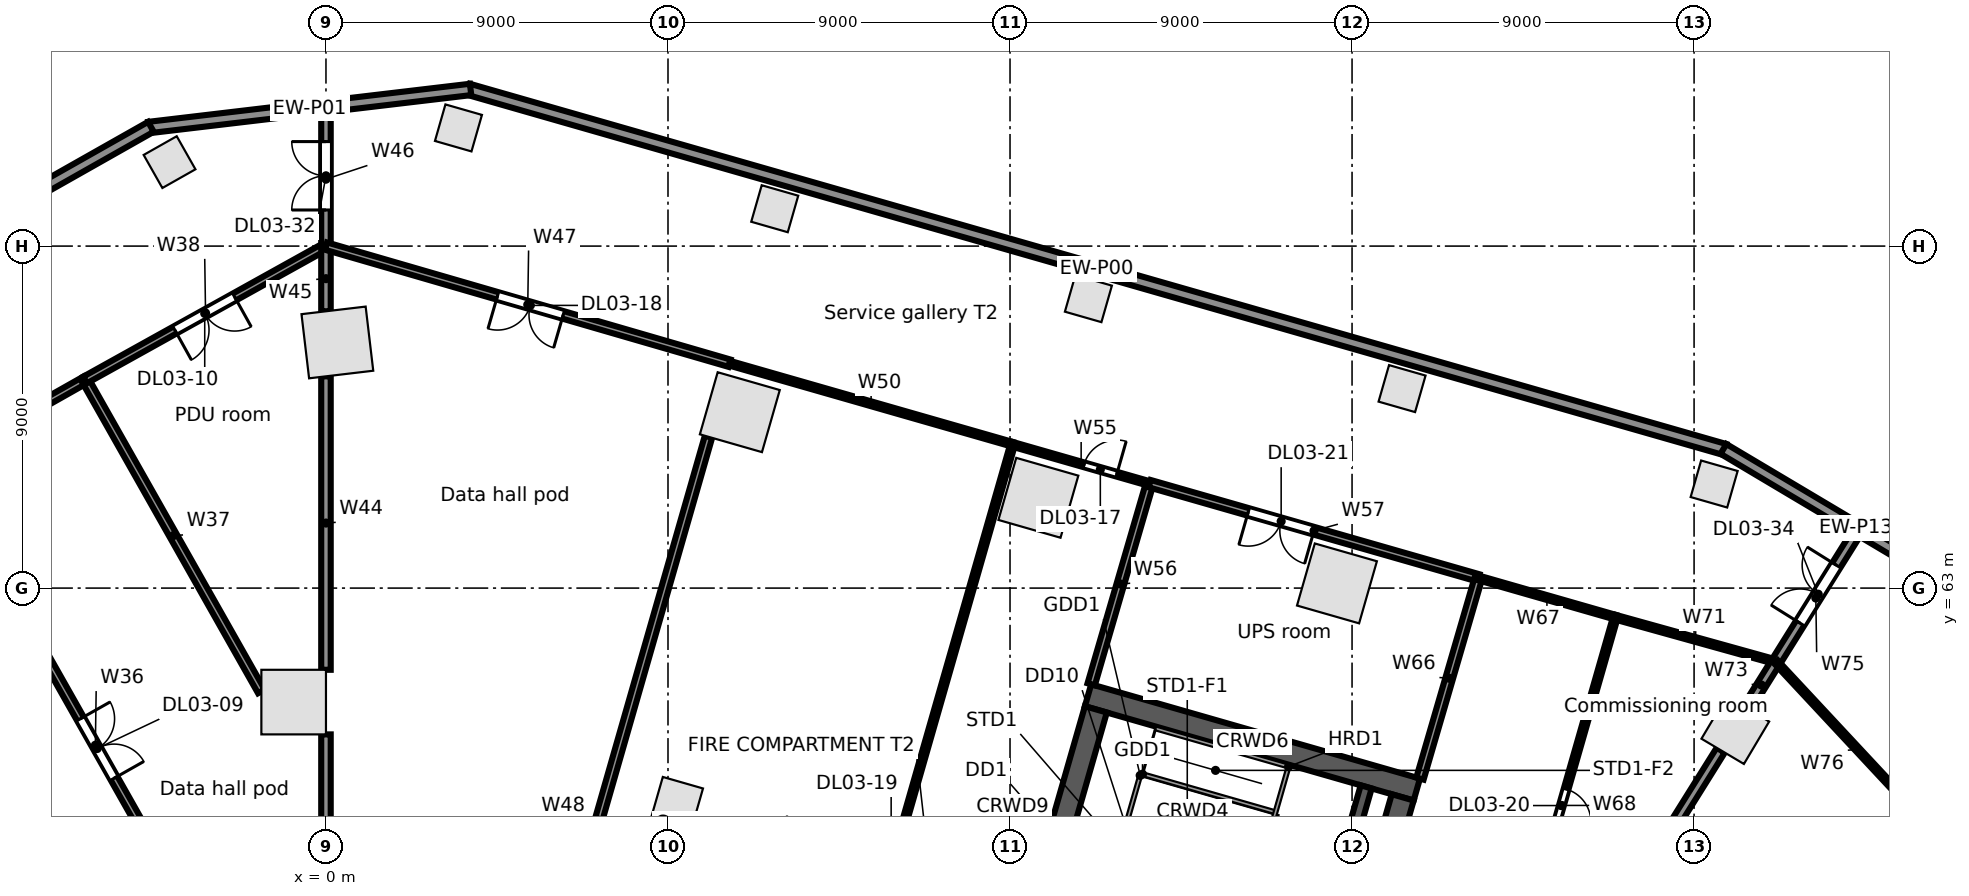
"""IFC4 building model, lengths in metres.
Left out: names, types, materials, properties, quantities, classifications, styles, units other than length and angle.
Written with IfcOpenShell. Run it as: python <this file> out.ifc"""

import sys

from ifc_helpers import new_model, si_unit, direction, frame, frame_2d, origin, origin_2d, place, context, subcontext, project, spatial, rectangle, extrude, element, fill, save


model = new_model("IFC4")
c1 = context("Model", 3, precision=1e-05, world=origin(), true_north=direction((0.0, 1.0)))
c2 = subcontext(c1, "Body", "Model", "MODEL_VIEW")
j1 = project(units=[si_unit("LENGTHUNIT", "METRE"), si_unit("PLANEANGLEUNIT", "RADIAN")], contexts=[c1])
p1 = place(None, origin())
s1 = spatial("IfcSite", under=j1, at=p1, CompositionType="ELEMENT")
p2 = place(p1, origin())
s2 = spatial("IfcBuilding", under=s1, at=p2, CompositionType="ELEMENT")
p3 = place(p2, frame((0.0, 0.0, 16.5)))
s3 = spatial("IfcBuildingStorey", under=s2, at=p3, CompositionType="ELEMENT", Elevation=16.5)
p4 = place(p3, frame((37.085, 59.262, 0.0), z_axis=(0.0, 0.0, 1.0), x_axis=(-0.859406411501, 0.511293086077, 0.0)))
e1 = element("IfcColumn", 1, at=p4, inside=s3, PredefinedType="COLUMN", context=c2, shape_type="SweptSolid", body=[
    extrude(rectangle(XDim=1.3, YDim=1.3, at=origin_2d()), origin(), (0.0, 0.0, 1.0), 5.0),
])
for number, where, z_axis, x_axis in (
    (2, (26.603, 63.124, 0.0), (0.0, 0.0, 1.0), (-0.961, 0.276, 0.0)),
    (3, (18.746, 65.376, 0.0), (0.0, 0.0, 1.0), (-0.961, 0.276, 0.0)),
    (4, (10.89, 67.629, 0.0), (0.0, 0.0, 1.0), (-0.961, 0.276, 0.0)),
    (5, (0.3, 69.464, 0.0), (0.0, 0.0, 1.0), (-0.993, -0.118, 0.0)),
    (6, (-0.85, 60.0, 0.0), (0.0, 0.0, 1.0), (0.0, 1.0, 0.0)),
):
    element("IfcColumn", number, at=place(p3, frame(where, z_axis=z_axis, x_axis=x_axis)), inside=s3, PredefinedType="COLUMN", context=c2, shape_type="SweptSolid", body=[
        extrude(rectangle(XDim=1.7, YDim=1.7, at=origin_2d()), origin(), (0.0, 0.0, 1.0), 5.0),
    ])
for number, where, z_axis, x_axis in (
    (7, (36.528, 65.739, 0.0), (0.0, 0.0, 1.0), (-0.961, 0.276, 0.0)),
    (8, (28.316, 68.25, 0.0), (0.0, 0.0, 1.0), (-0.961, 0.276, 0.0)),
    (9, (20.062, 70.616, 0.0), (0.0, 0.0, 1.0), (-0.961, 0.276, 0.0)),
    (10, (11.809, 72.983, 0.0), (0.0, 0.0, 1.0), (-0.961, 0.276, 0.0)),
    (11, (3.486, 75.11, 0.0), (0.0, 0.0, 1.0), (-0.961, 0.276, 0.0)),
    (12, (-4.116, 74.21, 0.0), (0.0, 0.0, 1.0), (-0.87, -0.492, 0.0)),
):
    element("IfcColumn", number, at=place(p3, frame(where, z_axis=z_axis, x_axis=x_axis)), inside=s3, PredefinedType="COLUMN", context=c2, shape_type="SweptSolid", body=[
        extrude(rectangle(XDim=1.0, YDim=1.0, at=origin_2d()), origin(), (0.0, 0.0, 1.0), 5.0),
    ])
p5 = place(p3, frame((9.241, 57.35, 0.0), z_axis=(0.0, 0.0, 1.0), x_axis=(0.961261695938, -0.275637355817, 0.0)))
e13 = element("IfcColumn", 13, at=p5, inside=s3, PredefinedType="COLUMN", context=c2, shape_type="SweptSolid", body=[
    extrude(rectangle(XDim=1.1, YDim=1.1, at=origin_2d()), origin(), (0.0, 0.0, 1.0), 5.0),
])
p6 = place(p3, frame((3.747, 76.127, 0.0), z_axis=(0.0, 0.0, 1.0), x_axis=(0.961261546185, -0.275637878067, 0.0)))
e14 = element("IfcWall", 14, at=p6, inside=s3, PredefinedType="STANDARD", context=c2, shape_type="SweptSolid", body=[
    extrude(rectangle(XDim=34.395, YDim=0.3, at=frame_2d((17.197, 0.0))), origin(), (0.0, 0.0, 1.0), 4.65),
])
p7 = place(p3, frame((-4.663, 75.12, 0.0), z_axis=(0.0, 0.0, 1.0), x_axis=(0.993070050845, 0.117523929966, 0.0)))
e15 = element("IfcWall", 15, at=p7, inside=s3, PredefinedType="STANDARD", context=c2, shape_type="SweptSolid", body=[
    extrude(rectangle(XDim=8.528, YDim=0.3, at=frame_2d((4.264, 0.0))), origin(), (0.0, 0.0, 1.0), 4.65),
])
p8 = place(p3, frame((-63.707, 41.701, 0.0), z_axis=(0.0, 0.0, 1.0), x_axis=(0.870355510268, 0.492423888277, 0.0)))
e16 = element("IfcWall", 16, at=p8, inside=s3, PredefinedType="STANDARD", context=c2, shape_type="SweptSolid", body=[
    extrude(rectangle(XDim=67.903, YDim=0.3, at=frame_2d((33.952, 0.0))), origin(), (0.0, 0.0, 1.0), 4.65),
])
p9 = place(p3, frame((36.773, 66.662, 0.0), z_axis=(0.0, 0.0, 1.0), x_axis=(0.859395976805, -0.511310624817, 0.0)))
e17 = element("IfcWall", 17, at=p9, inside=s3, PredefinedType="STANDARD", context=c2, shape_type="SweptSolid", body=[
    extrude(rectangle(XDim=8.102, YDim=0.3, at=frame_2d((4.051, 0.0))), origin(), (0.0, 0.0, 1.0), 4.65),
])
p10 = place(p3, frame((-11.681, 60.744, 0.0), z_axis=(0.0, 0.0, 1.0), x_axis=(0.492426772896, -0.870353878221, 0.0)))
e18 = element("IfcWall", 18, at=p10, inside=s3, PredefinedType="SOLIDWALL", context=c2, shape_type="SweptSolid", body=[
    extrude(rectangle(XDim=12.8, YDim=0.6, at=frame_2d((6.4, 0.0))), origin(), (0.0, 0.0, 1.0), 4.65),
])
p11 = place(p3, frame((20.053, 60.18, 0.0), z_axis=(0.0, 0.0, 1.0), x_axis=(0.96126248289, -0.275634611374, 0.0)))
e19 = element("IfcWall", 19, at=p11, inside=s3, PredefinedType="SOLIDWALL", context=c2, shape_type="SweptSolid", body=[
    extrude(rectangle(XDim=9.0, YDim=0.6, at=frame_2d((4.5, 0.0))), origin(), (0.0, 0.0, 1.0), 4.65),
])
p12 = place(p3, frame((17.282, 49.427, 0.0), z_axis=(0.0, 0.0, 1.0), x_axis=(0.275631631629, 0.961263337304, 0.0)))
e20 = element("IfcWall", 20, at=p12, inside=s3, PredefinedType="SOLIDWALL", context=c2, shape_type="SweptSolid", body=[
    extrude(rectangle(XDim=10.8, YDim=0.6, at=frame_2d((5.4, 0.0))), origin(), (0.0, 0.0, 1.0), 4.65),
])
p13 = place(p12, frame((4.8, 0.0, 0.0)))
e21 = element("IfcOpeningElement", 21, at=p13, cuts=e20, PredefinedType="OPENING", context=c2, shape_type="SweptSolid", body=[
    extrude(rectangle(XDim=1.2, YDim=2.1, at=frame_2d((0.6, 1.05))), frame((0.0, 0.31, 0.0), z_axis=(0.0, -1.0, 0.0), x_axis=(1.0, 0.0, 0.0)), (0.0, 0.0, 1.0), 0.62),
])
p14 = place(p3, frame((26.256, 53.876, 0.0), z_axis=(0.0, 0.0, 1.0), x_axis=(0.275612739511, 0.961268754209, 0.0)))
e22 = element("IfcWall", 22, at=p14, inside=s3, PredefinedType="SOLIDWALL", context=c2, shape_type="SweptSolid", body=[
    extrude(rectangle(XDim=4.05, YDim=0.3, at=frame_2d((2.025, 0.0))), origin(), (0.0, 0.0, 1.0), 4.65),
])
p15 = place(p3, frame((25.356, 47.112, 0.0), z_axis=(0.0, 0.0, 1.0), x_axis=(0.275631631629, 0.961263337304, 0.0)))
e23 = element("IfcWall", 23, at=p15, inside=s3, PredefinedType="SOLIDWALL", context=c2, shape_type="SweptSolid", body=[
    extrude(rectangle(XDim=10.8, YDim=0.6, at=frame_2d((5.4, 0.0))), origin(), (0.0, 0.0, 1.0), 4.65),
])
p16 = place(p15, frame((4.8, 0.0, 0.0)))
e24 = element("IfcOpeningElement", 24, at=p16, cuts=e23, PredefinedType="OPENING", context=c2, shape_type="SweptSolid", body=[
    extrude(rectangle(XDim=1.2, YDim=2.1, at=frame_2d((0.6, 1.05))), frame((0.0, 0.31, 0.0), z_axis=(0.0, -1.0, 0.0), x_axis=(1.0, 0.0, 0.0)), (0.0, 0.0, 1.0), 0.62),
])
p17 = place(p3, frame((-10.254, 66.263, 0.0), z_axis=(0.0, 0.0, 1.0), x_axis=(0.870454697906, 0.492248533664, 0.0)))
e25 = element("IfcWall", 25, at=p17, inside=s3, PredefinedType="PARTITIONING", context=c2, shape_type="SweptSolid", body=[
    extrude(rectangle(XDim=4.5, YDim=0.2, at=frame_2d((2.25, 0.0))), origin(), (0.0, 0.0, 1.0), 4.65),
])
p18 = place(p3, frame((-10.254, 66.263, 0.0), z_axis=(0.0, 0.0, 1.0), x_axis=(0.492411664329, -0.870362426138, 0.0)))
e26 = element("IfcWall", 26, at=p18, inside=s3, PredefinedType="PARTITIONING", context=c2, shape_type="SweptSolid", body=[
    extrude(rectangle(XDim=17.0, YDim=0.2, at=frame_2d((8.5, 0.0))), origin(), (0.0, 0.0, 1.0), 3.712),
])
p19 = place(p18, frame((7.7, 0.0, 0.0)))
e27 = element("IfcOpeningElement", 27, at=p19, cuts=e26, PredefinedType="OPENING", context=c2, shape_type="SweptSolid", body=[
    extrude(rectangle(XDim=1.8, YDim=2.1, at=frame_2d((0.9, 1.05))), frame((0.0, 0.11, 0.0), z_axis=(0.0, -1.0, 0.0), x_axis=(1.0, 0.0, 0.0)), (0.0, 0.0, 1.0), 0.22),
])
p20 = place(p3, frame((-6.337, 68.478, 0.0), z_axis=(0.0, 0.0, 1.0), x_axis=(0.492412602502, -0.870361895361, 0.0)))
e28 = element("IfcWall", 28, at=p20, inside=s3, PredefinedType="PARTITIONING", context=c2, shape_type="SweptSolid", body=[
    extrude(rectangle(XDim=9.417, YDim=0.2, at=frame_2d((4.708, 0.0))), origin(), (0.0, 0.0, 1.0), 3.712),
])
p21 = place(p3, frame((-6.337, 68.478, 0.0), z_axis=(0.0, 0.0, 1.0), x_axis=(0.87407148623, 0.485797320864, 0.0)))
e29 = element("IfcWall", 29, at=p21, inside=s3, PredefinedType="PARTITIONING", context=c2, shape_type="SweptSolid", body=[
    extrude(rectangle(XDim=7.25, YDim=0.2, at=frame_2d((3.625, 0.0))), origin(), (0.0, 0.0, 1.0), 3.93),
])
p22 = place(p21, frame((2.7, 0.0, 0.0)))
e30 = element("IfcOpeningElement", 30, at=p22, cuts=e29, PredefinedType="OPENING", context=c2, shape_type="SweptSolid", body=[
    extrude(rectangle(XDim=1.8, YDim=2.1, at=frame_2d((0.9, 1.05))), frame((0.0, 0.11, 0.0), z_axis=(0.0, -1.0, 0.0), x_axis=(1.0, 0.0, 0.0)), (0.0, 0.0, 1.0), 0.22),
])
p23 = place(p3, frame((0.0, 49.726, 0.0), z_axis=(0.0, 0.0, 1.0), x_axis=(0.0, 1.0, 0.0)))
e31 = element("IfcWall", 31, at=p23, inside=s3, PredefinedType="PARTITIONING", context=c2, shape_type="SweptSolid", body=[
    extrude(rectangle(XDim=9.424, YDim=0.25, at=frame_2d((4.712, 0.0))), origin(), (0.0, 0.0, 1.0), 4.65),
])
p24 = place(p3, frame((0.0, 60.85, 0.0), z_axis=(0.0, 0.0, 1.0), x_axis=(0.0, 1.0, 0.0)))
e32 = element("IfcWall", 32, at=p24, inside=s3, PredefinedType="PARTITIONING", context=c2, shape_type="SweptSolid", body=[
    extrude(rectangle(XDim=7.723, YDim=0.25, at=frame_2d((3.861, 0.0))), origin(), (0.0, 0.0, 1.0), 3.93),
])
p25 = place(p3, frame((0.0, 70.285, 0.0), z_axis=(0.0, 0.0, 1.0), x_axis=(0.0, 1.0, 0.0)))
e33 = element("IfcWall", 33, at=p25, inside=s3, PredefinedType="PARTITIONING", context=c2, shape_type="SweptSolid", body=[
    extrude(rectangle(XDim=1.715, YDim=0.25, at=frame_2d((0.857, 0.0))), origin(), (0.0, 0.0, 1.0), 4.65),
])
p26 = place(p3, frame((0.0, 72.0, 0.0), z_axis=(0.0, 0.0, 1.0), x_axis=(0.0, 1.0, 0.0)))
e34 = element("IfcWall", 34, at=p26, inside=s3, PredefinedType="PARTITIONING", context=c2, shape_type="SweptSolid", body=[
    extrude(rectangle(XDim=3.521, YDim=0.25, at=frame_2d((1.76, 0.0))), origin(), (0.0, 0.0, 1.0), 4.024),
])
p27 = place(p26, frame((0.95, 0.0, 0.0)))
e35 = element("IfcOpeningElement", 35, at=p27, cuts=e34, PredefinedType="OPENING", context=c2, shape_type="SweptSolid", body=[
    extrude(rectangle(XDim=1.8, YDim=2.1, at=frame_2d((0.9, 1.05))), frame((0.0, 0.135, 0.0), z_axis=(0.0, -1.0, 0.0), x_axis=(1.0, 0.0, 0.0)), (0.0, 0.0, 1.0), 0.27),
])
p28 = place(p3, frame((0.0, 72.0, 0.0), z_axis=(0.0, 0.0, 1.0), x_axis=(0.960375968852, -0.278707729443, 0.0)))
e36 = element("IfcWall", 36, at=p28, inside=s3, PredefinedType="PARTITIONING", context=c2, shape_type="SweptSolid", body=[
    extrude(rectangle(XDim=11.058, YDim=0.2, at=frame_2d((5.529, 0.0))), origin(), (0.0, 0.0, 1.0), 3.712),
])
p29 = place(p28, frame((4.7, 0.0, 0.0)))
e37 = element("IfcOpeningElement", 37, at=p29, cuts=e36, PredefinedType="OPENING", context=c2, shape_type="SweptSolid", body=[
    extrude(rectangle(XDim=1.8, YDim=2.1, at=frame_2d((0.9, 1.05))), frame((0.0, 0.11, 0.0), z_axis=(0.0, -1.0, 0.0), x_axis=(1.0, 0.0, 0.0)), (0.0, 0.0, 1.0), 0.22),
])
p30 = place(p3, frame((4.28, 46.809, 0.0), z_axis=(0.0, 0.0, 1.0), x_axis=(0.27566906052, 0.961252604195, 0.0)))
e38 = element("IfcWall", 38, at=p30, inside=s3, PredefinedType="PARTITIONING", context=c2, shape_type="SweptSolid", body=[
    extrude(rectangle(XDim=20.985, YDim=0.2, at=frame_2d((10.493, 0.0))), origin(), (0.0, 0.0, 1.0), 3.712),
])
p31 = place(p3, frame((10.62, 68.918, 0.0), z_axis=(0.0, 0.0, 1.0), x_axis=(0.961260764876, -0.275640602796, 0.0)))
e39 = element("IfcWall", 39, at=p31, inside=s3, PredefinedType="PARTITIONING", context=c2, shape_type="SweptSolid", body=[
    extrude(rectangle(XDim=7.749, YDim=0.125, at=frame_2d((3.875, 0.0))), origin(), (0.0, 0.0, 1.0), 3.712),
])
p32 = place(p3, frame((11.73, 44.673, 0.0), z_axis=(0.0, 0.0, 1.0), x_axis=(0.275616869382, 0.961267570093, 0.0)))
e40 = element("IfcWall", 40, at=p32, inside=s3, PredefinedType="PARTITIONING", context=c2, shape_type="SweptSolid", body=[
    extrude(rectangle(XDim=23.0, YDim=0.125, at=frame_2d((11.5, 0.0))), origin(), (0.0, 0.0, 1.0), 3.712),
])
p33 = place(p32, frame((10.95, 0.0, 0.0)))
e41 = element("IfcOpeningElement", 41, at=p33, cuts=e40, PredefinedType="OPENING", context=c2, shape_type="SweptSolid", body=[
    extrude(rectangle(XDim=0.9, YDim=2.1, at=frame_2d((0.45, 1.05))), frame((0.0, 0.073, 0.0), z_axis=(0.0, -1.0, 0.0), x_axis=(1.0, 0.0, 0.0)), (0.0, 0.0, 1.0), 0.145),
])
p34 = place(p3, frame((18.069, 66.782, 0.0), z_axis=(0.0, 0.0, 1.0), x_axis=(0.961314848061, -0.275451924837, 0.0)))
e42 = element("IfcWall", 42, at=p34, inside=s3, PredefinedType="PARTITIONING", context=c2, shape_type="SweptSolid", body=[
    extrude(rectangle(XDim=3.75, YDim=0.125, at=frame_2d((1.875, 0.0))), origin(), (0.0, 0.0, 1.0), 3.712),
])
p35 = place(p34, frame((1.95, 0.0, 0.0)))
e43 = element("IfcOpeningElement", 43, at=p35, cuts=e42, PredefinedType="OPENING", context=c2, shape_type="SweptSolid", body=[
    extrude(rectangle(XDim=0.9, YDim=2.1, at=frame_2d((0.45, 1.05))), frame((0.0, 0.073, 0.0), z_axis=(0.0, -1.0, 0.0), x_axis=(1.0, 0.0, 0.0)), (0.0, 0.0, 1.0), 0.145),
])
p36 = place(p3, frame((20.136, 60.468, 0.0), z_axis=(0.0, 0.0, 1.0), x_axis=(0.279630121779, 0.96010780384, 0.0)))
e44 = element("IfcWall", 44, at=p36, inside=s3, PredefinedType="PARTITIONING", context=c2, shape_type="SweptSolid", body=[
    extrude(rectangle(XDim=5.5, YDim=0.2, at=frame_2d((2.75, 0.0))), origin(), (0.0, 0.0, 1.0), 4.018),
])
p37 = place(p3, frame((21.674, 65.749, 0.0), z_axis=(0.0, 0.0, 1.0), x_axis=(0.961259417468, -0.275645301662, 0.0)))
e45 = element("IfcWall", 45, at=p37, inside=s3, PredefinedType="PARTITIONING", context=c2, shape_type="SweptSolid", body=[
    extrude(rectangle(XDim=9.0, YDim=0.2, at=frame_2d((4.5, 0.0))), origin(), (0.0, 0.0, 1.0), 3.822),
])
p38 = place(p37, frame((2.7, 0.0, 0.0)))
e46 = element("IfcOpeningElement", 46, at=p38, cuts=e45, PredefinedType="OPENING", context=c2, shape_type="SweptSolid", body=[
    extrude(rectangle(XDim=1.8, YDim=2.1, at=frame_2d((0.9, 1.05))), frame((0.0, 0.11, 0.0), z_axis=(0.0, -1.0, 0.0), x_axis=(1.0, 0.0, 0.0)), (0.0, 0.0, 1.0), 0.22),
])
p39 = place(p3, frame((28.787, 57.987, 0.0), z_axis=(0.0, 0.0, 1.0), x_axis=(0.279752860161, 0.960072047938, 0.0)))
e47 = element("IfcWall", 47, at=p39, inside=s3, PredefinedType="PARTITIONING", context=c2, shape_type="SweptSolid", body=[
    extrude(rectangle(XDim=5.501, YDim=0.2, at=frame_2d((2.75, 0.0))), origin(), (0.0, 0.0, 1.0), 3.922),
])
p40 = place(p3, frame((30.326, 63.268, 0.0), z_axis=(0.0, 0.0, 1.0), x_axis=(0.96120880595, -0.275821738383, 0.0)))
e48 = element("IfcWall", 48, at=p40, inside=s3, PredefinedType="PARTITIONING", context=c2, shape_type="SweptSolid", body=[
    extrude(rectangle(XDim=3.75, YDim=0.125, at=frame_2d((1.875, 0.0))), origin(), (0.0, 0.0, 1.0), 4.65),
])
p41 = place(p3, frame((31.089, 52.327, 0.0), z_axis=(0.0, 0.0, 1.0), x_axis=(0.275640835953, 0.961260698019, 0.0)))
e49 = element("IfcWall", 49, at=p41, inside=s3, PredefinedType="PARTITIONING", context=c2, shape_type="SweptSolid", body=[
    extrude(rectangle(XDim=10.306, YDim=0.125, at=frame_2d((5.153, 0.0))), origin(), (0.0, 0.0, 1.0), 3.922),
])
p42 = place(p41, frame((4.7, 0.0, 0.0)))
e50 = element("IfcOpeningElement", 50, at=p42, cuts=e49, PredefinedType="OPENING", context=c2, shape_type="SweptSolid", body=[
    extrude(rectangle(XDim=0.9, YDim=2.1, at=frame_2d((0.45, 1.05))), frame((0.0, 0.073, 0.0), z_axis=(0.0, -1.0, 0.0), x_axis=(1.0, 0.0, 0.0)), (0.0, 0.0, 1.0), 0.145),
])
p43 = place(p3, frame((31.795, 50.883, 0.0), z_axis=(0.0, 0.0, 1.0), x_axis=(0.529939676421, 0.848035340864, 0.0)))
e51 = element("IfcWall", 51, at=p43, inside=s3, PredefinedType="PARTITIONING", context=c2, shape_type="SweptSolid", body=[
    extrude(rectangle(XDim=9.258, YDim=0.25, at=frame_2d((4.629, 0.0))), origin(), (0.0, 0.0, 1.0), 3.73),
])
p44 = place(p3, frame((33.93, 62.234, 0.0), z_axis=(0.0, 0.0, 1.0), x_axis=(0.963433299433, -0.267948274007, 0.0)))
e52 = element("IfcWall", 52, at=p44, inside=s3, PredefinedType="PARTITIONING", context=c2, shape_type="SweptSolid", body=[
    extrude(rectangle(XDim=4.385, YDim=0.125, at=frame_2d((2.192, 0.0))), origin(), (0.0, 0.0, 1.0), 4.018),
])
p45 = place(p3, frame((37.39, 59.837, 0.0), z_axis=(0.0, 0.0, 1.0), x_axis=(0.530151180786, 0.84790313451, 0.0)))
e53 = element("IfcWall", 53, at=p45, inside=s3, PredefinedType="PARTITIONING", context=c2, shape_type="SweptSolid", body=[
    extrude(rectangle(XDim=1.441, YDim=0.25, at=frame_2d((0.721, 0.0))), origin(), (0.0, 0.0, 1.0), 4.65),
])
p46 = place(p3, frame((38.154, 61.059, 0.0), z_axis=(0.0, 0.0, 1.0), x_axis=(0.529921368013, 0.848046781565, 0.0)))
e54 = element("IfcWall", 54, at=p46, inside=s3, PredefinedType="PARTITIONING", context=c2, shape_type="SweptSolid", body=[
    extrude(rectangle(XDim=3.961, YDim=0.25, at=frame_2d((1.98, 0.0))), origin(), (0.0, 0.0, 1.0), 4.024),
])
p47 = place(p46, frame((1.2, 0.0, 0.0)))
e55 = element("IfcOpeningElement", 55, at=p47, cuts=e54, PredefinedType="OPENING", context=c2, shape_type="SweptSolid", body=[
    extrude(rectangle(XDim=1.8, YDim=2.1, at=frame_2d((0.9, 1.05))), frame((0.0, 0.135, 0.0), z_axis=(0.0, -1.0, 0.0), x_axis=(1.0, 0.0, 0.0)), (0.0, 0.0, 1.0), 0.27),
])
p48 = place(p3, frame((38.154, 61.059, 0.0), z_axis=(0.0, 0.0, 1.0), x_axis=(0.681663875787, -0.731665470312, 0.0)))
e56 = element("IfcWall", 56, at=p48, inside=s3, PredefinedType="PARTITIONING", context=c2, shape_type="SweptSolid", body=[
    extrude(rectangle(XDim=6.303, YDim=0.125, at=frame_2d((3.152, 0.0))), origin(), (0.0, 0.0, 1.0), 4.018),
])
p49 = place(p19, origin())
e57 = element("IfcDoor", 57, at=p49, inside=s3, OperationType="DOUBLE_DOOR_SINGLE_SWING", PredefinedType="DOOR", context=c2, shape_type="SweptSolid", body=[
    extrude(rectangle(XDim=1.8, YDim=2.1, at=frame_2d((0.9, 1.05))), frame((0.0, 0.025, 0.0), z_axis=(0.0, -1.0, 0.0), x_axis=(1.0, 0.0, 0.0)), (0.0, 0.0, 1.0), 0.05),
])
fill(e27, e57)
p50 = place(p22, frame((1.8, 0.0, 0.0), z_axis=(0.0, 0.0, 1.0), x_axis=(-1.0, 0.0, 0.0)))
e58 = element("IfcDoor", 58, at=p50, inside=s3, OperationType="DOUBLE_DOOR_SINGLE_SWING", PredefinedType="DOOR", context=c2, shape_type="SweptSolid", body=[
    extrude(rectangle(XDim=1.8, YDim=2.1, at=frame_2d((0.9, 1.05))), frame((0.0, 0.025, 0.0), z_axis=(0.0, -1.0, 0.0), x_axis=(1.0, 0.0, 0.0)), (0.0, 0.0, 1.0), 0.05),
])
fill(e30, e58)
p51 = place(p35, origin())
e59 = element("IfcDoor", 59, at=p51, inside=s3, OperationType="SINGLE_SWING_RIGHT", PredefinedType="DOOR", context=c2, shape_type="SweptSolid", body=[
    extrude(rectangle(XDim=0.9, YDim=2.1, at=frame_2d((0.45, 1.05))), frame((0.0, 0.025, 0.0), z_axis=(0.0, -1.0, 0.0), x_axis=(1.0, 0.0, 0.0)), (0.0, 0.0, 1.0), 0.05),
])
fill(e43, e59)
p52 = place(p29, frame((1.8, 0.0, 0.0), z_axis=(0.0, 0.0, 1.0), x_axis=(-1.0, 0.0, 0.0)))
e60 = element("IfcDoor", 60, at=p52, inside=s3, OperationType="DOUBLE_DOOR_SINGLE_SWING", PredefinedType="DOOR", context=c2, shape_type="SweptSolid", body=[
    extrude(rectangle(XDim=1.8, YDim=2.1, at=frame_2d((0.9, 1.05))), frame((0.0, 0.025, 0.0), z_axis=(0.0, -1.0, 0.0), x_axis=(1.0, 0.0, 0.0)), (0.0, 0.0, 1.0), 0.05),
])
fill(e37, e60)
p53 = place(p42, frame((0.9, 0.0, 0.0), z_axis=(0.0, 0.0, 1.0), x_axis=(-1.0, 0.0, 0.0)))
e61 = element("IfcDoor", 61, at=p53, inside=s3, OperationType="SINGLE_SWING_RIGHT", PredefinedType="DOOR", context=c2, shape_type="SweptSolid", body=[
    extrude(rectangle(XDim=0.9, YDim=2.1, at=frame_2d((0.45, 1.05))), frame((0.0, 0.025, 0.0), z_axis=(0.0, -1.0, 0.0), x_axis=(1.0, 0.0, 0.0)), (0.0, 0.0, 1.0), 0.05),
])
fill(e50, e61)
p54 = place(p38, frame((1.8, 0.0, 0.0), z_axis=(0.0, 0.0, 1.0), x_axis=(-1.0, 0.0, 0.0)))
e62 = element("IfcDoor", 62, at=p54, inside=s3, OperationType="DOUBLE_DOOR_SINGLE_SWING", PredefinedType="DOOR", context=c2, shape_type="SweptSolid", body=[
    extrude(rectangle(XDim=1.8, YDim=2.1, at=frame_2d((0.9, 1.05))), frame((0.0, 0.025, 0.0), z_axis=(0.0, -1.0, 0.0), x_axis=(1.0, 0.0, 0.0)), (0.0, 0.0, 1.0), 0.05),
])
fill(e46, e62)
p55 = place(p27, origin())
e63 = element("IfcDoor", 63, at=p55, inside=s3, OperationType="DOUBLE_DOOR_SINGLE_SWING", PredefinedType="DOOR", context=c2, shape_type="SweptSolid", body=[
    extrude(rectangle(XDim=1.8, YDim=2.1, at=frame_2d((0.9, 1.05))), frame((0.0, 0.025, 0.0), z_axis=(0.0, -1.0, 0.0), x_axis=(1.0, 0.0, 0.0)), (0.0, 0.0, 1.0), 0.05),
])
fill(e35, e63)
p56 = place(p47, origin())
e64 = element("IfcDoor", 64, at=p56, inside=s3, OperationType="DOUBLE_DOOR_SINGLE_SWING", PredefinedType="DOOR", context=c2, shape_type="SweptSolid", body=[
    extrude(rectangle(XDim=1.8, YDim=2.1, at=frame_2d((0.9, 1.05))), frame((0.0, 0.025, 0.0), z_axis=(0.0, -1.0, 0.0), x_axis=(1.0, 0.0, 0.0)), (0.0, 0.0, 1.0), 0.05),
])
fill(e55, e64)
save(model, sys.argv[1])
